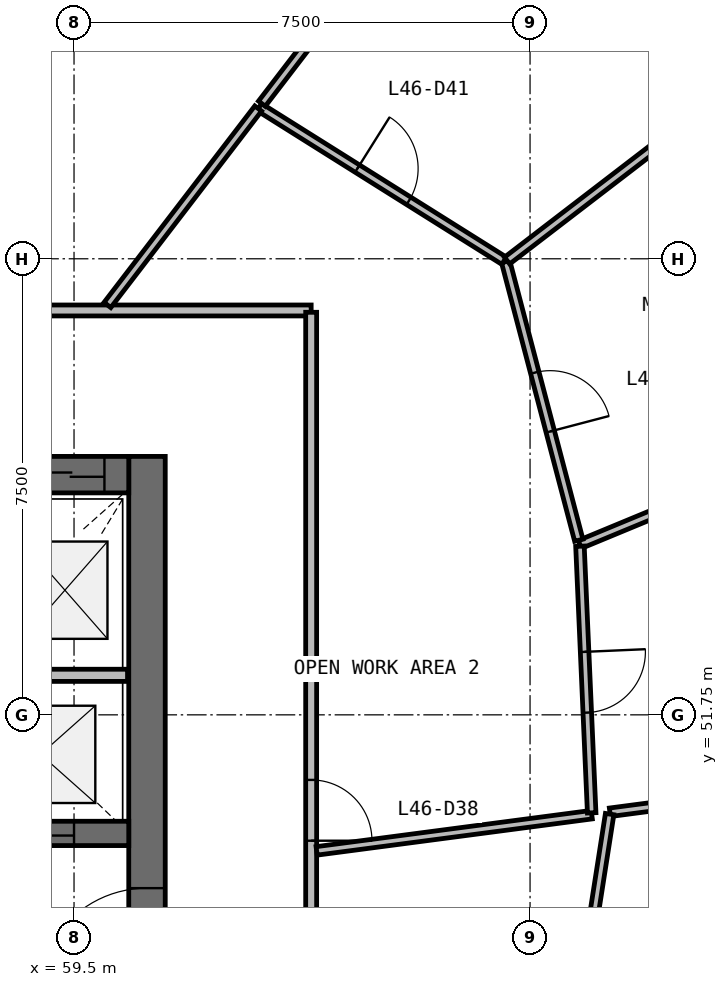
"""IFC4 building model, lengths in metres.
Left out: names, types, materials, properties, quantities, classifications, styles, units other than length and angle.
Written with IfcOpenShell. Run it as: python <this file> out.ifc"""

import sys

from ifc_helpers import new_model, si_unit, direction, frame, frame_2d, origin, place, context, subcontext, project, spatial, rectangle, extrude, source, transform, mapped, element, fill, save


model = new_model("IFC4")
c1 = context("Model", 3, precision=1e-05, world=origin(), true_north=direction((0.0, 1.0)))
c2 = subcontext(c1, "Body", "Model", "MODEL_VIEW")
j1 = project(units=[si_unit("LENGTHUNIT", "METRE"), si_unit("PLANEANGLEUNIT", "RADIAN")], contexts=[c1])
p1 = place(None, origin())
s1 = spatial("IfcSite", under=j1, at=p1, CompositionType="ELEMENT")
p2 = place(p1, origin())
s2 = spatial("IfcBuilding", under=s1, at=p2, CompositionType="ELEMENT")
p3 = place(p2, frame((0.0, 0.0, 191.6)))
s3 = spatial("IfcBuildingStorey", under=s2, at=p3, CompositionType="ELEMENT", Elevation=191.6)
p4 = place(p3, frame((60.7, 40.0, 0.0), z_axis=(0.0, 0.0, 1.0), x_axis=(0.0, 1.0, 0.0)))
e1 = element("IfcWall", 1, at=p4, inside=s3, PredefinedType="SHEAR", context=c2, shape_type="SweptSolid", body=[
    extrude(rectangle(XDim=16.0, YDim=0.6, at=frame_2d((8.0, 0.0))), origin(), (0.0, 0.0, 1.0), 3.9),
])
p5 = place(p4, frame((7.1, 0.0, 0.0)))
e2 = element("IfcOpeningElement", 2, at=p5, cuts=e1, PredefinedType="OPENING", context=c2, shape_type="SweptSolid", body=[
    extrude(rectangle(XDim=1.8, YDim=2.1, at=frame_2d((0.9, 1.05))), frame((0.0, 0.31, 0.0), z_axis=(0.0, -1.0, 0.0), x_axis=(1.0, 0.0, 0.0)), (0.0, 0.0, 1.0), 0.62),
])
p6 = place(p3, frame((60.4, 55.7, 0.0), z_axis=(0.0, 0.0, 1.0), x_axis=(-1.0, 0.0, 0.0)))
e3 = element("IfcWall", 3, at=p6, inside=s3, PredefinedType="SHEAR", context=c2, shape_type="SweptSolid", body=[
    extrude(rectangle(XDim=16.8, YDim=0.6, at=frame_2d((8.4, 0.0))), origin(), (0.0, 0.0, 1.0), 3.9),
])
p7 = place(p6, frame((0.4, 0.0, 0.0)))
e4 = element("IfcOpeningElement", 4, at=p7, cuts=e3, PredefinedType="OPENING", context=c2, shape_type="SweptSolid", body=[
    extrude(rectangle(XDim=1.1, YDim=2.1, at=frame_2d((0.55, 1.05))), frame((0.0, 0.31, 0.0), z_axis=(0.0, -1.0, 0.0), x_axis=(1.0, 0.0, 0.0)), (0.0, 0.0, 1.0), 0.62),
])
p8 = place(p6, frame((10.3, 0.0, 0.0)))
e5 = element("IfcOpeningElement", 5, at=p8, cuts=e3, PredefinedType="OPENING", context=c2, shape_type="SweptSolid", body=[
    extrude(rectangle(XDim=1.2, YDim=2.1, at=frame_2d((0.6, 1.05))), frame((0.0, 0.31, 0.0), z_axis=(0.0, -1.0, 0.0), x_axis=(1.0, 0.0, 0.0)), (0.0, 0.0, 1.0), 0.62),
])
p9 = place(p6, frame((7.25, 0.0, 0.0)))
e6 = element("IfcOpeningElement", 6, at=p9, cuts=e3, PredefinedType="OPENING", context=c2, shape_type="SweptSolid", body=[
    extrude(rectangle(XDim=1.1, YDim=2.1, at=frame_2d((0.55, 1.05))), frame((0.0, 0.31, 0.0), z_axis=(0.0, -1.0, 0.0), x_axis=(1.0, 0.0, 0.0)), (0.0, 0.0, 1.0), 0.62),
])
p10 = place(p3, frame((43.6, 49.8, 0.0), z_axis=(0.0, 0.0, 1.0), x_axis=(1.0, 0.0, 0.0)))
e7 = element("IfcWall", 7, at=p10, inside=s3, PredefinedType="SHEAR", context=c2, shape_type="SweptSolid", body=[
    extrude(rectangle(XDim=16.8, YDim=0.4, at=frame_2d((8.4, 0.0))), origin(), (0.0, 0.0, 1.0), 3.9),
])
p11 = place(p10, frame((9.8, 0.0, 0.0)))
e8 = element("IfcOpeningElement", 8, at=p11, cuts=e7, PredefinedType="OPENING", context=c2, shape_type="SweptSolid", body=[
    extrude(rectangle(XDim=1.1, YDim=2.1, at=frame_2d((0.55, 1.05))), frame((0.0, 0.21, 0.0), z_axis=(0.0, -1.0, 0.0), x_axis=(1.0, 0.0, 0.0)), (0.0, 0.0, 1.0), 0.42),
])
p12 = place(p10, frame((12.3, 0.0, 0.0)))
e9 = element("IfcOpeningElement", 9, at=p12, cuts=e7, PredefinedType="OPENING", context=c2, shape_type="SweptSolid", body=[
    extrude(rectangle(XDim=1.1, YDim=2.1, at=frame_2d((0.55, 1.05))), frame((0.0, 0.21, 0.0), z_axis=(0.0, -1.0, 0.0), x_axis=(1.0, 0.0, 0.0)), (0.0, 0.0, 1.0), 0.42),
])
p13 = place(p10, frame((14.8, 0.0, 0.0)))
e10 = element("IfcOpeningElement", 10, at=p13, cuts=e7, PredefinedType="OPENING", context=c2, shape_type="SweptSolid", body=[
    extrude(rectangle(XDim=1.1, YDim=2.1, at=frame_2d((0.55, 1.05))), frame((0.0, 0.21, 0.0), z_axis=(0.0, -1.0, 0.0), x_axis=(1.0, 0.0, 0.0)), (0.0, 0.0, 1.0), 0.42),
])
p14 = place(p10, frame((2.05, 0.0, 0.0)))
e11 = element("IfcOpeningElement", 11, at=p14, cuts=e7, PredefinedType="OPENING", context=c2, shape_type="SweptSolid", body=[
    extrude(rectangle(XDim=0.9, YDim=2.1, at=frame_2d((0.45, 1.05))), frame((0.0, 0.21, 0.0), z_axis=(0.0, -1.0, 0.0), x_axis=(1.0, 0.0, 0.0)), (0.0, 0.0, 1.0), 0.42),
])
p15 = place(p10, frame((5.25, 0.0, 0.0)))
e12 = element("IfcOpeningElement", 12, at=p15, cuts=e7, PredefinedType="OPENING", context=c2, shape_type="SweptSolid", body=[
    extrude(rectangle(XDim=0.9, YDim=2.1, at=frame_2d((0.45, 1.05))), frame((0.0, 0.21, 0.0), z_axis=(0.0, -1.0, 0.0), x_axis=(1.0, 0.0, 0.0)), (0.0, 0.0, 1.0), 0.42),
])
p16 = place(p10, frame((7.85, 0.0, 0.0)))
e13 = element("IfcOpeningElement", 13, at=p16, cuts=e7, PredefinedType="OPENING", context=c2, shape_type="SweptSolid", body=[
    extrude(rectangle(XDim=0.9, YDim=2.1, at=frame_2d((0.45, 1.05))), frame((0.0, 0.21, 0.0), z_axis=(0.0, -1.0, 0.0), x_axis=(1.0, 0.0, 0.0)), (0.0, 0.0, 1.0), 0.42),
])
p17 = place(p3, frame((60.38, 52.4, 0.0), z_axis=(0.0, 0.0, 1.0), x_axis=(-1.0, 0.0, 0.0)))
e14 = element("IfcWall", 14, at=p17, inside=s3, PredefinedType="SOLIDWALL", context=c2, shape_type="SweptSolid", body=[
    extrude(rectangle(XDim=1.85, YDim=0.2, at=frame_2d((0.925, 0.0))), origin(), (0.0, 0.0, 1.0), 3.58),
])
p18 = place(p3, frame((40.6, 58.4, 0.0), z_axis=(0.0, 0.0, 1.0), x_axis=(1.0, 0.0, 0.0)))
e15 = element("IfcWall", 15, at=p18, inside=s3, PredefinedType="PARTITIONING", context=c2, shape_type="SweptSolid", body=[
    extrude(rectangle(XDim=22.8, YDim=0.18, at=frame_2d((11.4, 0.0))), origin(), (0.0, 0.0, 1.0), 2.88),
])
p19 = place(p18, frame((12.95, 0.0, 0.0)))
e16 = element("IfcOpeningElement", 16, at=p19, cuts=e15, PredefinedType="OPENING", context=c2, shape_type="SweptSolid", body=[
    extrude(rectangle(XDim=1.0, YDim=2.1, at=frame_2d((0.5, 1.05))), frame((0.0, 0.1, 0.0), z_axis=(0.0, -1.0, 0.0), x_axis=(1.0, 0.0, 0.0)), (0.0, 0.0, 1.0), 0.2),
])
p20 = place(p18, frame((10.95, 0.0, 0.0)))
e17 = element("IfcOpeningElement", 17, at=p20, cuts=e15, PredefinedType="OPENING", context=c2, shape_type="SweptSolid", body=[
    extrude(rectangle(XDim=1.0, YDim=2.1, at=frame_2d((0.5, 1.05))), frame((0.0, 0.1, 0.0), z_axis=(0.0, -1.0, 0.0), x_axis=(1.0, 0.0, 0.0)), (0.0, 0.0, 1.0), 0.2),
])
p21 = place(p18, frame((5.75, 0.0, 0.0)))
e18 = element("IfcOpeningElement", 18, at=p21, cuts=e15, PredefinedType="OPENING", context=c2, shape_type="SweptSolid", body=[
    extrude(rectangle(XDim=1.0, YDim=2.1, at=frame_2d((0.5, 1.05))), frame((0.0, 0.1, 0.0), z_axis=(0.0, -1.0, 0.0), x_axis=(1.0, 0.0, 0.0)), (0.0, 0.0, 1.0), 0.2),
])
p22 = place(p3, frame((63.4, 58.37, 0.0), z_axis=(0.0, 0.0, 1.0), x_axis=(0.0, -1.0, 0.0)))
e19 = element("IfcWall", 19, at=p22, inside=s3, PredefinedType="PARTITIONING", context=c2, shape_type="SweptSolid", body=[
    extrude(rectangle(XDim=20.74, YDim=0.18, at=frame_2d((10.37, 0.0))), origin(), (0.0, 0.0, 1.0), 2.88),
])
p23 = place(p22, frame((9.89, 0.0, 0.0)))
e20 = element("IfcOpeningElement", 20, at=p23, cuts=e19, PredefinedType="OPENING", context=c2, shape_type="SweptSolid", body=[
    extrude(rectangle(XDim=1.0, YDim=2.1, at=frame_2d((0.5, 1.05))), frame((0.0, 0.1, 0.0), z_axis=(0.0, -1.0, 0.0), x_axis=(1.0, 0.0, 0.0)), (0.0, 0.0, 1.0), 0.2),
])
p24 = place(p22, frame((7.69, 0.0, 0.0)))
e21 = element("IfcOpeningElement", 21, at=p24, cuts=e19, PredefinedType="OPENING", context=c2, shape_type="SweptSolid", body=[
    extrude(rectangle(XDim=1.0, YDim=2.1, at=frame_2d((0.5, 1.05))), frame((0.0, 0.1, 0.0), z_axis=(0.0, -1.0, 0.0), x_axis=(1.0, 0.0, 0.0)), (0.0, 0.0, 1.0), 0.2),
])
p25 = place(p3, frame((67.82, 54.552, 0.0), z_axis=(0.0, 0.0, 1.0), x_axis=(0.923864546683, 0.382719609353, 0.0)))
e22 = element("IfcWall", 22, at=p25, inside=s3, PredefinedType="PARTITIONING", context=c2, shape_type="SweptSolid", body=[
    extrude(rectangle(XDim=4.885, YDim=0.14, at=frame_2d((2.442, 0.0))), origin(), (0.0, 0.0, 1.0), 2.88),
])
p26 = place(p3, frame((66.599, 59.202, 0.0), z_axis=(0.0, 0.0, 1.0), x_axis=(0.253980714002, -0.967209282893, 0.0)))
e23 = element("IfcWall", 23, at=p26, inside=s3, PredefinedType="PARTITIONING", context=c2, shape_type="SweptSolid", body=[
    extrude(rectangle(XDim=4.736, YDim=0.14, at=frame_2d((2.368, 0.0))), origin(), (0.0, 0.0, 1.0), 2.88),
])
p27 = place(p26, frame((1.886, 0.0, 0.0)))
e24 = element("IfcOpeningElement", 24, at=p27, cuts=e23, PredefinedType="OPENING", context=c2, shape_type="SweptSolid", body=[
    extrude(rectangle(XDim=1.0, YDim=2.1, at=frame_2d((0.5, 1.05))), frame((0.0, 0.08, 0.0), z_axis=(0.0, -1.0, 0.0), x_axis=(1.0, 0.0, 0.0)), (0.0, 0.0, 1.0), 0.16),
])
p28 = place(p3, frame((62.547, 61.745, 0.0), z_axis=(0.0, 0.0, 1.0), x_axis=(0.846992708554, -0.531604506806, 0.0)))
e25 = element("IfcWall", 25, at=p28, inside=s3, PredefinedType="PARTITIONING", context=c2, shape_type="SweptSolid", body=[
    extrude(rectangle(XDim=4.754, YDim=0.14, at=frame_2d((2.377, 0.0))), origin(), (0.0, 0.0, 1.0), 2.88),
])
p29 = place(p28, frame((1.904, 0.0, 0.0)))
e26 = element("IfcOpeningElement", 26, at=p29, cuts=e25, PredefinedType="OPENING", context=c2, shape_type="SweptSolid", body=[
    extrude(rectangle(XDim=1.0, YDim=2.1, at=frame_2d((0.5, 1.05))), frame((0.0, 0.08, 0.0), z_axis=(0.0, -1.0, 0.0), x_axis=(1.0, 0.0, 0.0)), (0.0, 0.0, 1.0), 0.16),
])
p30 = place(p3, frame((63.49, 49.513, 0.0), z_axis=(0.0, 0.0, 1.0), x_axis=(0.991445189432, 0.130523700346, 0.0)))
e27 = element("IfcWall", 27, at=p30, inside=s3, PredefinedType="PARTITIONING", context=c2, shape_type="SweptSolid", body=[
    extrude(rectangle(XDim=4.564, YDim=0.14, at=frame_2d((2.282, 0.0))), origin(), (0.0, 0.0, 1.0), 2.88),
])
p31 = place(p3, frame((67.821, 54.523, 0.0), z_axis=(0.0, 0.0, 1.0), x_axis=(0.043891066245, -0.999036322815, 0.0)))
e28 = element("IfcWall", 28, at=p31, inside=s3, PredefinedType="PARTITIONING", context=c2, shape_type="SweptSolid", body=[
    extrude(rectangle(XDim=4.389, YDim=0.14, at=frame_2d((2.194, 0.0))), origin(), (0.0, 0.0, 1.0), 2.88),
])
p32 = place(p31, frame((1.739, 0.0, 0.0)))
e29 = element("IfcOpeningElement", 29, at=p32, cuts=e28, PredefinedType="OPENING", context=c2, shape_type="SweptSolid", body=[
    extrude(rectangle(XDim=1.0, YDim=2.1, at=frame_2d((0.5, 1.05))), frame((0.0, 0.08, 0.0), z_axis=(0.0, -1.0, 0.0), x_axis=(1.0, 0.0, 0.0)), (0.0, 0.0, 1.0), 0.16),
])
p33 = place(p3, frame((68.313, 50.148, 0.0), z_axis=(0.0, 0.0, 1.0), x_axis=(0.991443942206, 0.130533173806, 0.0)))
e30 = element("IfcWall", 30, at=p33, inside=s3, PredefinedType="PARTITIONING", context=c2, shape_type="SweptSolid", body=[
    extrude(rectangle(XDim=4.335, YDim=0.14, at=frame_2d((2.168, 0.0))), origin(), (0.0, 0.0, 1.0), 2.88),
])
p34 = place(p3, frame((68.309, 50.118, 0.0), z_axis=(0.0, 0.0, 1.0), x_axis=(-0.154216660459, -0.988037054789, 0.0)))
e31 = element("IfcWall", 31, at=p34, inside=s3, PredefinedType="PARTITIONING", context=c2, shape_type="SweptSolid", body=[
    extrude(rectangle(XDim=4.23, YDim=0.14, at=frame_2d((2.115, 0.0))), origin(), (0.0, 0.0, 1.0), 2.88),
])
p35 = place(p34, frame((1.58, 0.0, 0.0)))
e32 = element("IfcOpeningElement", 32, at=p35, cuts=e31, PredefinedType="OPENING", context=c2, shape_type="SweptSolid", body=[
    extrude(rectangle(XDim=1.0, YDim=2.1, at=frame_2d((0.5, 1.05))), frame((0.0, 0.08, 0.0), z_axis=(0.0, -1.0, 0.0), x_axis=(1.0, 0.0, 0.0)), (0.0, 0.0, 1.0), 0.16),
])
p36 = place(p3, frame((60.049, 58.49, 0.0), z_axis=(0.0, 0.0, 1.0), x_axis=(0.608739821429, 0.793369919903, 0.0)))
e33 = element("IfcWall", 33, at=p36, inside=s3, PredefinedType="PARTITIONING", context=c2, shape_type="SweptSolid", body=[
    extrude(rectangle(XDim=4.073, YDim=0.14, at=frame_2d((2.036, 0.0))), origin(), (0.0, 0.0, 1.0), 2.88),
])
p37 = place(p3, frame((66.622, 59.22, 0.0), z_axis=(0.0, 0.0, 1.0), x_axis=(0.793364115727, 0.60874738593, 0.0)))
e34 = element("IfcWall", 34, at=p37, inside=s3, PredefinedType="PARTITIONING", context=c2, shape_type="SweptSolid", body=[
    extrude(rectangle(XDim=3.553, YDim=0.14, at=frame_2d((1.777, 0.0))), origin(), (0.0, 0.0, 1.0), 2.88),
])
p38 = place(p3, frame((62.59, 61.801, 0.0), z_axis=(0.0, 0.0, 1.0), x_axis=(0.608788963613, 0.793332211487, 0.0)))
e35 = element("IfcWall", 35, at=p38, inside=s3, PredefinedType="PARTITIONING", context=c2, shape_type="SweptSolid", body=[
    extrude(rectangle(XDim=3.355, YDim=0.14, at=frame_2d((1.677, 0.0))), origin(), (0.0, 0.0, 1.0), 2.88),
])
m1 = source(origin(), c2, "Body", "SweptSolid", [
    extrude(rectangle(XDim=1.8, YDim=2.1, at=frame_2d((0.9, 1.05))), frame((0.0, 0.025, 0.0), z_axis=(0.0, -1.0, 0.0), x_axis=(1.0, 0.0, 0.0)), (0.0, 0.0, 1.0), 0.05),
])
p39 = place(p5, origin())
e36 = element("IfcDoor", 36, at=p39, inside=s3, OperationType="SINGLE_SWING_LEFT", PredefinedType="DOOR", context=c2, shape_type="MappedRepresentation", body=[
    mapped(m1, transform((0.0, 0.0, 0.0), scale=1.0)),
])
fill(e2, e36)
m2 = source(origin(), c2, "Body", "SweptSolid", [
    extrude(rectangle(XDim=1.1, YDim=2.1, at=frame_2d((0.55, 1.05))), frame((0.0, 0.025, 0.0), z_axis=(0.0, -1.0, 0.0), x_axis=(1.0, 0.0, 0.0)), (0.0, 0.0, 1.0), 0.05),
])
p40 = place(p13, origin())
e37 = element("IfcDoor", 37, at=p40, inside=s3, OperationType="DOUBLE_DOOR_SLIDING", PredefinedType="USERDEFINED", context=c2, shape_type="MappedRepresentation", body=[
    mapped(m2, transform((0.0, 0.0, 0.0), scale=1.0)),
])
fill(e10, e37)
p41 = place(p7, origin())
e38 = element("IfcDoor", 38, at=p41, inside=s3, OperationType="DOUBLE_DOOR_SLIDING", PredefinedType="USERDEFINED", context=c2, shape_type="MappedRepresentation", body=[
    mapped(m2, transform((0.0, 0.0, 0.0), scale=1.0)),
])
fill(e4, e38)
m3 = source(origin(), c2, "Body", "SweptSolid", [
    extrude(rectangle(XDim=1.0, YDim=2.1, at=frame_2d((0.5, 1.05))), frame((0.0, 0.025, 0.0), z_axis=(0.0, -1.0, 0.0), x_axis=(1.0, 0.0, 0.0)), (0.0, 0.0, 1.0), 0.05),
])
p42 = place(p24, origin())
e39 = element("IfcDoor", 39, at=p42, inside=s3, OperationType="SINGLE_SWING_RIGHT", PredefinedType="DOOR", context=c2, shape_type="MappedRepresentation", body=[
    mapped(m3, transform((0.0, 0.0, 0.0), scale=1.0)),
])
fill(e21, e39)
p43 = place(p32, origin())
e40 = element("IfcDoor", 40, at=p43, inside=s3, OperationType="SINGLE_SWING_LEFT", PredefinedType="DOOR", context=c2, shape_type="MappedRepresentation", body=[
    mapped(m3, transform((0.0, 0.0, 0.0), scale=1.0)),
])
fill(e29, e40)
p44 = place(p27, origin())
e41 = element("IfcDoor", 41, at=p44, inside=s3, OperationType="SINGLE_SWING_RIGHT", PredefinedType="DOOR", context=c2, shape_type="MappedRepresentation", body=[
    mapped(m3, transform((0.0, 0.0, 0.0), scale=1.0)),
])
fill(e24, e41)
p45 = place(p29, origin())
e42 = element("IfcDoor", 42, at=p45, inside=s3, OperationType="SINGLE_SWING_LEFT", PredefinedType="DOOR", context=c2, shape_type="MappedRepresentation", body=[
    mapped(m3, transform((0.0, 0.0, 0.0), scale=1.0)),
])
fill(e26, e42)
save(model, sys.argv[1])
